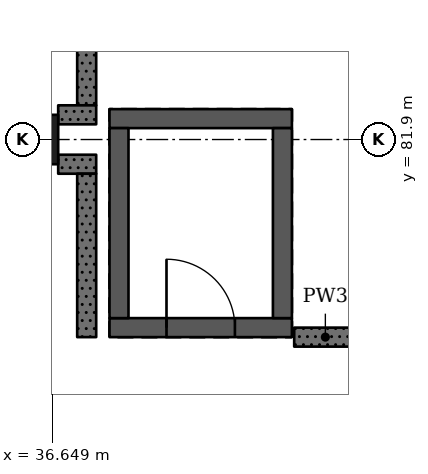
"""IFC4 building model, lengths in metres.
Left out: names, types, materials, properties, quantities, classifications, styles, units other than length and angle.
Written with IfcOpenShell. Run it as: python <this file> out.ifc"""

import sys

from ifc_helpers import new_model, si_unit, direction, frame, frame_2d, origin, origin_2d, place, context, subcontext, project, spatial, rectangle, extrude, element, fill, save


model = new_model("IFC4")
c1 = context("Model", 3, precision=1e-05, world=origin(), true_north=direction((0.0, 1.0)))
c2 = subcontext(c1, "Body", "Model", "MODEL_VIEW")
j1 = project(units=[si_unit("LENGTHUNIT", "METRE"), si_unit("PLANEANGLEUNIT", "RADIAN")], contexts=[c1])
p1 = place(None, origin())
s1 = spatial("IfcSite", under=j1, at=p1, CompositionType="ELEMENT")
p2 = place(p1, origin())
s2 = spatial("IfcBuilding", under=s1, at=p2, CompositionType="ELEMENT")
p3 = place(p2, frame((0.0, 0.0, 15.47)))
s3 = spatial("IfcBuildingStorey", under=s2, at=p3, CompositionType="ELEMENT", Elevation=15.47)
p4 = place(p3, frame((36.4, 81.9, 0.0), z_axis=(0.0, 0.0, 1.0), x_axis=(1.0, 0.0, 0.0)))
e1 = element("IfcColumn", 1, at=p4, inside=s3, PredefinedType="COLUMN", context=c2, shape_type="SweptSolid", body=[
    extrude(rectangle(XDim=0.65, YDim=0.65, at=origin_2d()), origin(), (0.0, 0.0, 1.0), 4.55),
])
p5 = place(p3, frame((39.8, 79.425, 0.0), z_axis=(0.0, 0.0, 1.0), x_axis=(-1.0, 0.0, 0.0)))
e2 = element("IfcWall", 2, at=p5, inside=s3, PredefinedType="SHEAR", context=c2, shape_type="SweptSolid", body=[
    extrude(rectangle(XDim=2.4, YDim=0.25, at=frame_2d((1.2, 0.0))), origin(), (0.0, 0.0, 1.0), 4.55),
])
p6 = place(p5, frame((0.75, 0.0, 0.0)))
e3 = element("IfcOpeningElement", 3, at=p6, cuts=e2, PredefinedType="OPENING", context=c2, shape_type="SweptSolid", body=[
    extrude(rectangle(XDim=0.9, YDim=2.1, at=frame_2d((0.45, 1.05))), frame((0.0, 0.135, 0.0), z_axis=(0.0, -1.0, 0.0), x_axis=(1.0, 0.0, 0.0)), (0.0, 0.0, 1.0), 0.27),
])
p7 = place(p3, frame((39.8, 82.175, 0.0), z_axis=(0.0, 0.0, 1.0), x_axis=(-1.0, 0.0, 0.0)))
e4 = element("IfcWall", 4, at=p7, inside=s3, PredefinedType="SHEAR", context=c2, shape_type="SweptSolid", body=[
    extrude(rectangle(XDim=2.4, YDim=0.25, at=frame_2d((1.2, 0.0))), origin(), (0.0, 0.0, 1.0), 4.55),
])
for number, where, z_axis, x_axis in (
    (5, (37.525, 82.05, 0.0), (0.0, 0.0, 1.0), (0.0, -1.0, 0.0)),
    (6, (39.675, 82.05, 0.0), (0.0, 0.0, 1.0), (0.0, -1.0, 0.0)),
):
    element("IfcWall", number, at=place(p3, frame(where, z_axis=z_axis, x_axis=x_axis)), inside=s3, PredefinedType="SHEAR", context=c2, shape_type="SweptSolid", body=[
        extrude(rectangle(XDim=2.5, YDim=0.25, at=frame_2d((1.25, 0.0))), origin(), (0.0, 0.0, 1.0), 4.55),
    ])
p8 = place(p3, frame((36.725, 81.575, 0.0), z_axis=(0.0, 0.0, 1.0), x_axis=(1.0, 0.0, 0.0)))
e7 = element("IfcWall", 7, at=p8, inside=s3, PredefinedType="SOLIDWALL", context=c2, shape_type="SweptSolid", body=[
    extrude(rectangle(XDim=0.5, YDim=0.25, at=frame_2d((0.25, 0.0))), origin(), (0.0, 0.0, 1.0), 4.3),
])
p9 = place(p3, frame((37.1, 81.45, 0.0), z_axis=(0.0, 0.0, 1.0), x_axis=(0.0, -1.0, 0.0)))
e8 = element("IfcWall", 8, at=p9, inside=s3, PredefinedType="SOLIDWALL", context=c2, shape_type="SweptSolid", body=[
    extrude(rectangle(XDim=2.15, YDim=0.25, at=frame_2d((1.075, 0.0))), origin(), (0.0, 0.0, 1.0), 4.3),
])
p10 = place(p3, frame((37.1, 89.275, 0.0), z_axis=(0.0, 0.0, 1.0), x_axis=(0.0, -1.0, 0.0)))
e9 = element("IfcWall", 9, at=p10, inside=s3, PredefinedType="SOLIDWALL", context=c2, shape_type="SweptSolid", body=[
    extrude(rectangle(XDim=6.925, YDim=0.25, at=frame_2d((3.462, 0.0))), origin(), (0.0, 0.0, 1.0), 4.3),
])
p11 = place(p3, frame((37.225, 82.225, 0.0), z_axis=(0.0, 0.0, 1.0), x_axis=(-1.0, 0.0, 0.0)))
e10 = element("IfcWall", 10, at=p11, inside=s3, PredefinedType="SOLIDWALL", context=c2, shape_type="SweptSolid", body=[
    extrude(rectangle(XDim=0.5, YDim=0.25, at=frame_2d((0.25, 0.0))), origin(), (0.0, 0.0, 1.0), 4.3),
])
p12 = place(p3, frame((40.65, 79.3, 0.0), z_axis=(0.0, 0.0, 1.0), x_axis=(-1.0, 0.0, 0.0)))
e11 = element("IfcWall", 11, at=p12, inside=s3, PredefinedType="SOLIDWALL", context=c2, shape_type="SweptSolid", body=[
    extrude(rectangle(XDim=0.82, YDim=0.25, at=frame_2d((0.41, 0.0))), origin(), (0.0, 0.0, 1.0), 4.3),
])
p13 = place(p6, origin())
e12 = element("IfcDoor", 12, at=p13, inside=s3, OperationType="SINGLE_SWING_RIGHT", PredefinedType="DOOR", context=c2, shape_type="SweptSolid", body=[
    extrude(rectangle(XDim=0.9, YDim=2.1, at=frame_2d((0.45, 1.05))), frame((0.0, 0.025, 0.0), z_axis=(0.0, -1.0, 0.0), x_axis=(1.0, 0.0, 0.0)), (0.0, 0.0, 1.0), 0.05),
])
fill(e3, e12)
save(model, sys.argv[1])
